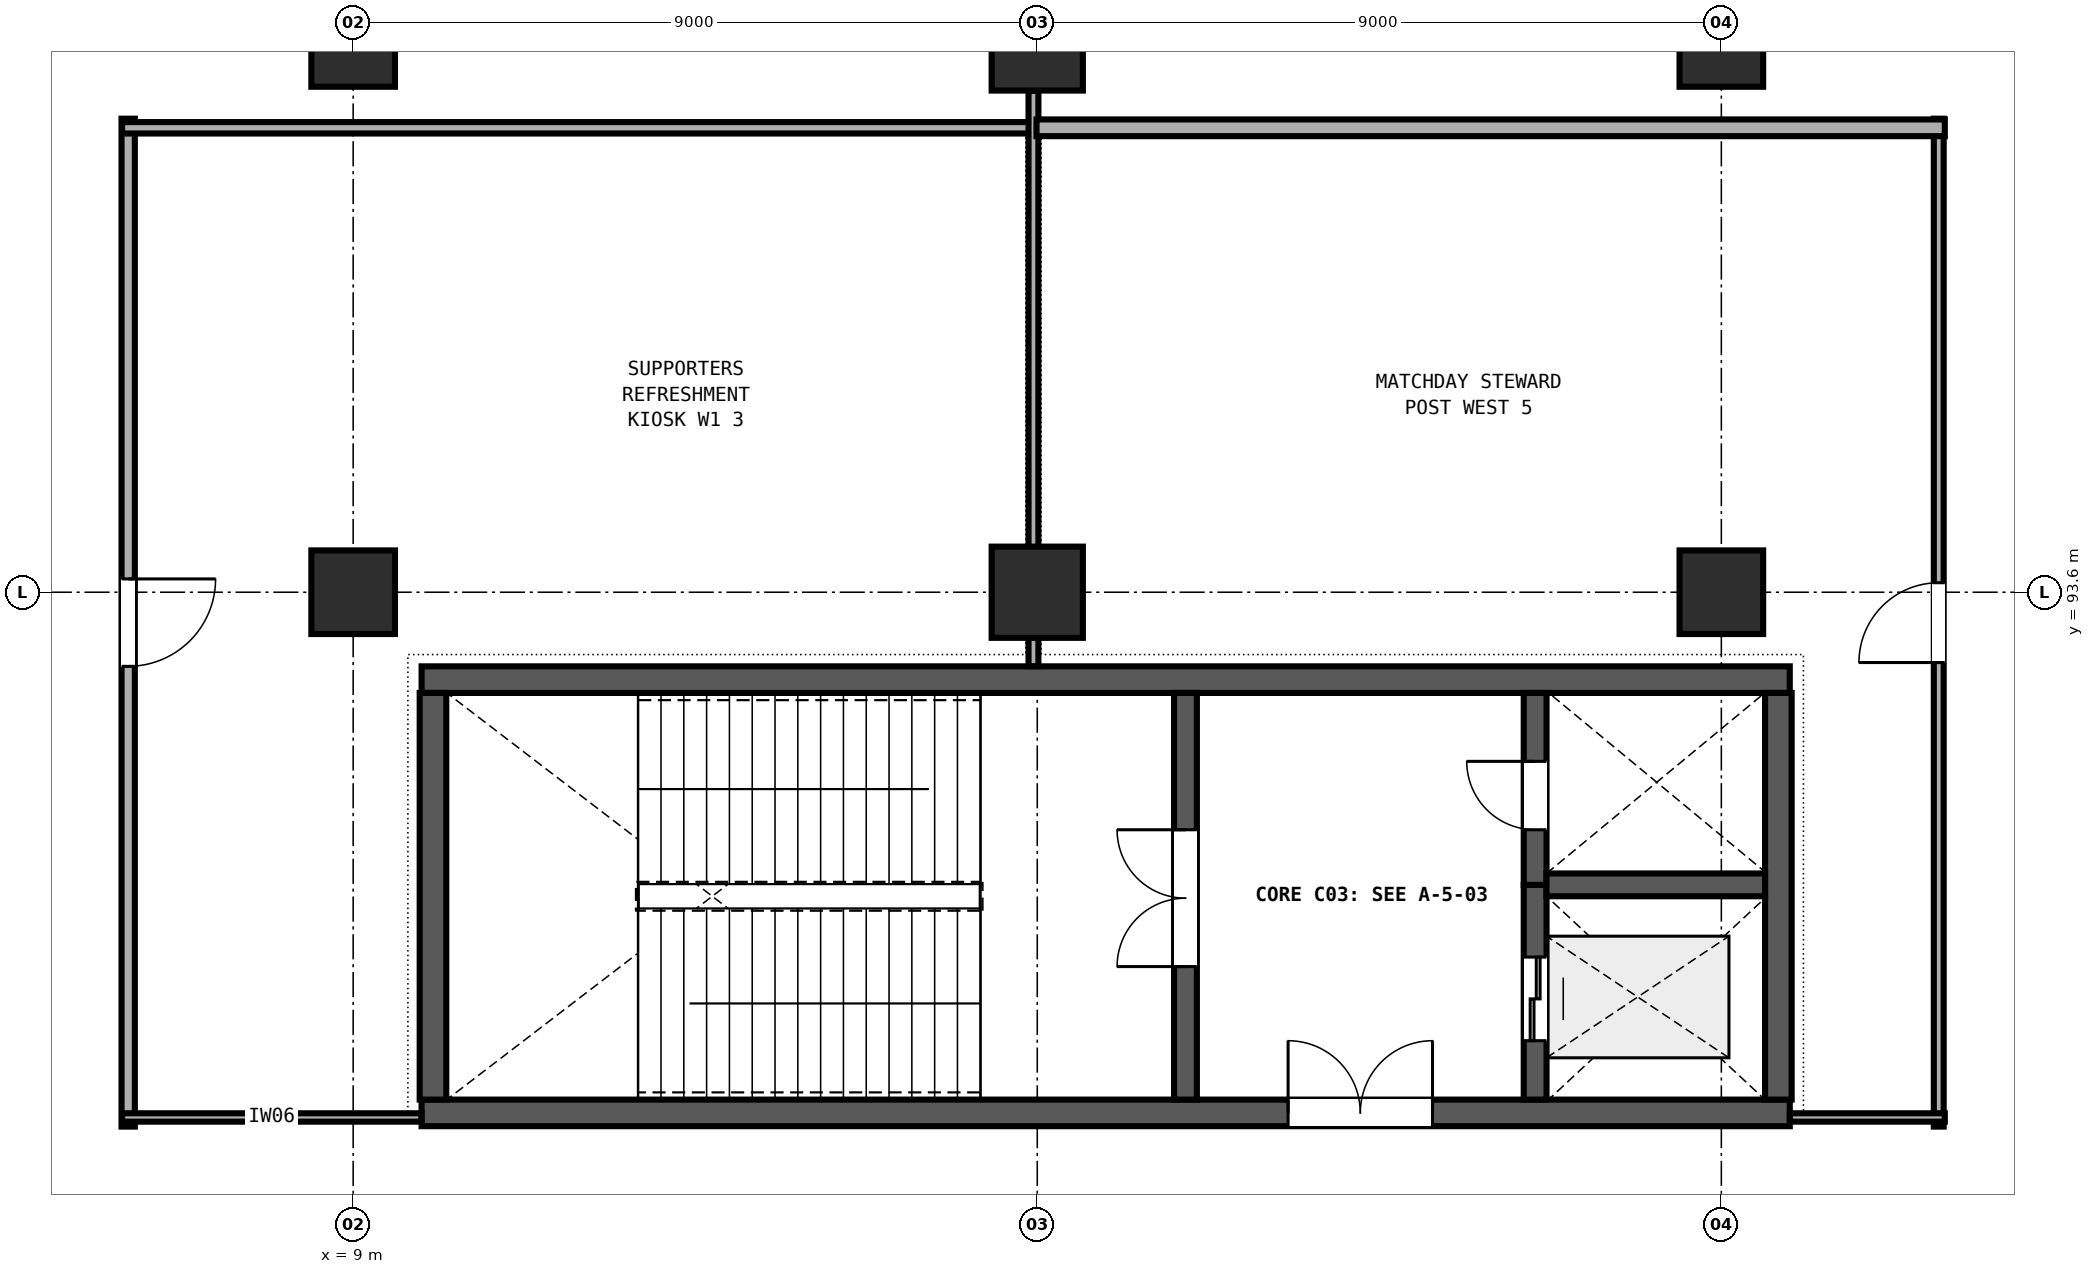
"""IFC4 building model, lengths in metres.
Left out: names, types, materials, properties, quantities, classifications, styles, units other than length and angle.
Written with IfcOpenShell. Run it as: python <this file> out.ifc"""

import sys

from ifc_helpers import new_model, si_unit, direction, frame, frame_2d, origin, origin_2d, place, context, subcontext, project, spatial, rectangle, extrude, element, fill, save


model = new_model("IFC4")
c1 = context("Model", 3, precision=1e-05, world=origin(), true_north=direction((0.0, 1.0)))
c2 = subcontext(c1, "Body", "Model", "MODEL_VIEW")
j1 = project(units=[si_unit("LENGTHUNIT", "METRE"), si_unit("PLANEANGLEUNIT", "RADIAN")], contexts=[c1])
p1 = place(None, origin())
s1 = spatial("IfcSite", under=j1, at=p1, CompositionType="ELEMENT")
p2 = place(p1, origin())
s2 = spatial("IfcBuilding", under=s1, at=p2, CompositionType="ELEMENT")
p3 = place(p2, frame((0.0, 0.0, 4.8)))
s3 = spatial("IfcBuildingStorey", under=s2, at=p3, CompositionType="ELEMENT", Elevation=4.8)
for number, where, z_axis, x_axis in (
    (1, (9.0, 93.6, 0.0), (0.0, 0.0, 1.0), (1.0, 0.0, 0.0)),
    (2, (9.0, 100.8, 0.0), (0.0, 0.0, 1.0), (1.0, 0.0, 0.0)),
):
    element("IfcColumn", number, at=place(p3, frame(where, z_axis=z_axis, x_axis=x_axis)), inside=s3, PredefinedType="COLUMN", context=c2, shape_type="SweptSolid", body=[
        extrude(rectangle(XDim=1.1, YDim=1.1, at=origin_2d()), origin(), (0.0, 0.0, 1.0), 4.8),
    ])
for number, where, z_axis, x_axis in (
    (3, (18.0, 93.6, 0.0), (0.0, 0.0, 1.0), (1.0, 0.0, 0.0)),
    (4, (18.0, 100.8, 0.0), (0.0, 0.0, 1.0), (1.0, 0.0, 0.0)),
):
    element("IfcColumn", number, at=place(p3, frame(where, z_axis=z_axis, x_axis=x_axis)), inside=s3, PredefinedType="COLUMN", context=c2, shape_type="SweptSolid", body=[
        extrude(rectangle(XDim=1.2, YDim=1.2, at=origin_2d()), origin(), (0.0, 0.0, 1.0), 4.8),
    ])
for number, where, z_axis, x_axis in (
    (5, (27.0, 93.6, 0.0), (0.0, 0.0, 1.0), (1.0, 0.0, 0.0)),
    (6, (27.0, 100.8, 0.0), (0.0, 0.0, 1.0), (1.0, 0.0, 0.0)),
):
    element("IfcColumn", number, at=place(p3, frame(where, z_axis=z_axis, x_axis=x_axis)), inside=s3, PredefinedType="COLUMN", context=c2, shape_type="SweptSolid", body=[
        extrude(rectangle(XDim=1.1, YDim=1.1, at=origin_2d()), origin(), (0.0, 0.0, 1.0), 4.8),
    ])
p4 = place(p3, frame((9.9, 86.75, 0.0), z_axis=(0.0, 0.0, 1.0), x_axis=(1.0, 0.0, 0.0)))
e7 = element("IfcWall", 7, at=p4, inside=s3, PredefinedType="SHEAR", context=c2, shape_type="SweptSolid", body=[
    extrude(rectangle(XDim=18.0, YDim=0.35, at=frame_2d((9.0, 0.0))), origin(), (0.0, 0.0, 1.0), 4.52),
])
p5 = place(p4, frame((11.4, 0.0, 0.0)))
e8 = element("IfcOpeningElement", 8, at=p5, cuts=e7, PredefinedType="OPENING", context=c2, shape_type="SweptSolid", body=[
    extrude(rectangle(XDim=1.9, YDim=2.25, at=frame_2d((0.95, 1.125))), frame((0.0, 0.185, 0.0), z_axis=(0.0, -1.0, 0.0), x_axis=(1.0, 0.0, 0.0)), (0.0, 0.0, 1.0), 0.37),
])
p6 = place(p3, frame((27.9, 92.45, 0.0), z_axis=(0.0, 0.0, 1.0), x_axis=(-1.0, 0.0, 0.0)))
e9 = element("IfcWall", 9, at=p6, inside=s3, PredefinedType="SHEAR", context=c2, shape_type="SweptSolid", body=[
    extrude(rectangle(XDim=18.0, YDim=0.35, at=frame_2d((9.0, 0.0))), origin(), (0.0, 0.0, 1.0), 4.52),
])
for number, where, z_axis, x_axis in (
    (10, (10.05, 92.275, 0.0), (0.0, 0.0, 1.0), (0.0, -1.0, 0.0)),
    (11, (27.75, 86.925, 0.0), (0.0, 0.0, 1.0), (0.0, 1.0, 0.0)),
):
    element("IfcWall", number, at=place(p3, frame(where, z_axis=z_axis, x_axis=x_axis)), inside=s3, PredefinedType="SHEAR", context=c2, shape_type="SweptSolid", body=[
        extrude(rectangle(XDim=5.35, YDim=0.35, at=frame_2d((2.675, 0.0))), origin(), (0.0, 0.0, 1.0), 4.52),
    ])
p7 = place(p3, frame((19.95, 86.925, 0.0), z_axis=(0.0, 0.0, 1.0), x_axis=(0.0, 1.0, 0.0)))
e12 = element("IfcWall", 12, at=p7, inside=s3, PredefinedType="SHEAR", context=c2, shape_type="SweptSolid", body=[
    extrude(rectangle(XDim=5.35, YDim=0.3, at=frame_2d((2.675, 0.0))), origin(), (0.0, 0.0, 1.0), 4.52),
])
p8 = place(p7, frame((1.75, 0.0, 0.0)))
e13 = element("IfcOpeningElement", 13, at=p8, cuts=e12, PredefinedType="OPENING", context=c2, shape_type="SweptSolid", body=[
    extrude(rectangle(XDim=1.8, YDim=2.25, at=frame_2d((0.9, 1.125))), frame((0.0, 0.16, 0.0), z_axis=(0.0, -1.0, 0.0), x_axis=(1.0, 0.0, 0.0)), (0.0, 0.0, 1.0), 0.32),
])
p9 = place(p3, frame((24.55, 86.925, 0.0), z_axis=(0.0, 0.0, 1.0), x_axis=(0.0, 1.0, 0.0)))
e14 = element("IfcWall", 14, at=p9, inside=s3, PredefinedType="SHEAR", context=c2, shape_type="SweptSolid", body=[
    extrude(rectangle(XDim=2.825, YDim=0.3, at=frame_2d((1.413, 0.0))), origin(), (0.0, 0.0, 1.0), 4.52),
])
p10 = place(p9, frame((0.775, 0.0, 0.0)))
e15 = element("IfcOpeningElement", 15, at=p10, cuts=e14, PredefinedType="OPENING", context=c2, shape_type="SweptSolid", body=[
    extrude(rectangle(XDim=1.1, YDim=2.1, at=frame_2d((0.55, 1.05))), frame((0.0, 0.16, 0.0), z_axis=(0.0, -1.0, 0.0), x_axis=(1.0, 0.0, 0.0)), (0.0, 0.0, 1.0), 0.32),
])
p11 = place(p3, frame((24.55, 89.75, 0.0), z_axis=(0.0, 0.0, 1.0), x_axis=(0.0, 1.0, 0.0)))
e16 = element("IfcWall", 16, at=p11, inside=s3, PredefinedType="SHEAR", context=c2, shape_type="SweptSolid", body=[
    extrude(rectangle(XDim=2.525, YDim=0.3, at=frame_2d((1.262, 0.0))), origin(), (0.0, 0.0, 1.0), 4.52),
])
p12 = place(p11, frame((0.725, 0.0, 0.0)))
e17 = element("IfcOpeningElement", 17, at=p12, cuts=e16, PredefinedType="OPENING", context=c2, shape_type="SweptSolid", body=[
    extrude(rectangle(XDim=0.9, YDim=2.1, at=frame_2d((0.45, 1.05))), frame((0.0, 0.16, 0.0), z_axis=(0.0, -1.0, 0.0), x_axis=(1.0, 0.0, 0.0)), (0.0, 0.0, 1.0), 0.32),
])
p13 = place(p3, frame((24.7, 89.75, 0.0), z_axis=(0.0, 0.0, 1.0), x_axis=(1.0, 0.0, 0.0)))
e18 = element("IfcWall", 18, at=p13, inside=s3, PredefinedType="SHEAR", context=c2, shape_type="SweptSolid", body=[
    extrude(rectangle(XDim=2.875, YDim=0.3, at=frame_2d((1.438, 0.0))), origin(), (0.0, 0.0, 1.0), 4.52),
])
p14 = place(p3, frame((6.04, 99.83, 0.0), z_axis=(0.0, 0.0, 1.0), x_axis=(0.0, -1.0, 0.0)))
e19 = element("IfcWall", 19, at=p14, inside=s3, PredefinedType="PARTITIONING", context=c2, shape_type="SweptSolid", body=[
    extrude(rectangle(XDim=13.26, YDim=0.175, at=frame_2d((6.63, 0.0))), origin(), (0.0, 0.0, 1.0), 3.28),
])
p15 = place(p14, frame((6.055, 0.0, 0.0)))
e20 = element("IfcOpeningElement", 20, at=p15, cuts=e19, PredefinedType="OPENING", context=c2, shape_type="SweptSolid", body=[
    extrude(rectangle(XDim=1.15, YDim=2.15, at=frame_2d((0.575, 1.075))), frame((0.0, 0.097, 0.0), z_axis=(0.0, -1.0, 0.0), x_axis=(1.0, 0.0, 0.0)), (0.0, 0.0, 1.0), 0.195),
])
p16 = place(p3, frame((5.96, 99.71, 0.0), z_axis=(0.0, 0.0, 1.0), x_axis=(1.0, 0.0, 0.0)))
e21 = element("IfcWall", 21, at=p16, inside=s3, PredefinedType="PARTITIONING", context=c2, shape_type="SweptSolid", body=[
    extrude(rectangle(XDim=11.95, YDim=0.15, at=frame_2d((5.975, 0.0))), origin(), (0.0, 0.0, 1.0), 3.28),
])
p17 = place(p3, frame((17.95, 100.198, 0.0), z_axis=(0.0, 0.0, 1.0), x_axis=(0.0, -1.0, 0.0)))
e22 = element("IfcWall", 22, at=p17, inside=s3, PredefinedType="PARTITIONING", context=c2, shape_type="SweptSolid", body=[
    extrude(rectangle(XDim=7.571, YDim=0.13, at=frame_2d((3.786, 0.0))), origin(), (0.0, 0.0, 1.0), 3.28),
])
p18 = place(p3, frame((9.898, 86.69, 0.0), z_axis=(0.0, 0.0, 1.0), x_axis=(-1.0, 0.0, 0.0)))
e23 = element("IfcWall", 23, at=p18, inside=s3, PredefinedType="PARTITIONING", context=c2, shape_type="SweptSolid", body=[
    extrude(rectangle(XDim=3.938, YDim=0.11, at=frame_2d((1.969, 0.0))), origin(), (0.0, 0.0, 1.0), 3.28),
])
p19 = place(p3, frame((29.86, 86.57, 0.0), z_axis=(0.0, 0.0, 1.0), x_axis=(0.0, 1.0, 0.0)))
e24 = element("IfcWall", 24, at=p19, inside=s3, PredefinedType="PARTITIONING", context=c2, shape_type="SweptSolid", body=[
    extrude(rectangle(XDim=13.26, YDim=0.13, at=frame_2d((6.63, 0.0))), origin(), (0.0, 0.0, 1.0), 3.28),
])
p20 = place(p19, frame((6.105, 0.0, 0.0)))
e25 = element("IfcOpeningElement", 25, at=p20, cuts=e24, PredefinedType="OPENING", context=c2, shape_type="SweptSolid", body=[
    extrude(rectangle(XDim=1.05, YDim=2.1, at=frame_2d((0.525, 1.05))), frame((0.0, 0.075, 0.0), z_axis=(0.0, -1.0, 0.0), x_axis=(1.0, 0.0, 0.0)), (0.0, 0.0, 1.0), 0.15),
])
p21 = place(p3, frame((29.94, 86.69, 0.0), z_axis=(0.0, 0.0, 1.0), x_axis=(-1.0, 0.0, 0.0)))
e26 = element("IfcWall", 26, at=p21, inside=s3, PredefinedType="PARTITIONING", context=c2, shape_type="SweptSolid", body=[
    extrude(rectangle(XDim=2.038, YDim=0.11, at=frame_2d((1.019, 0.0))), origin(), (0.0, 0.0, 1.0), 3.28),
])
p22 = place(p3, frame((17.99, 99.71, 0.0), z_axis=(0.0, 0.0, 1.0), x_axis=(1.0, 0.0, 0.0)))
e27 = element("IfcWall", 27, at=p22, inside=s3, PredefinedType="PARTITIONING", context=c2, shape_type="SweptSolid", body=[
    extrude(rectangle(XDim=11.95, YDim=0.22, at=frame_2d((5.975, 0.0))), origin(), (0.0, 0.0, 1.0), 3.28),
])
p23 = place(p8, origin())
e28 = element("IfcDoor", 28, at=p23, inside=s3, OperationType="DOUBLE_DOOR_SINGLE_SWING", PredefinedType="DOOR", context=c2, shape_type="SweptSolid", body=[
    extrude(rectangle(XDim=1.8, YDim=2.25, at=frame_2d((0.9, 1.125))), frame((0.0, 0.025, 0.0), z_axis=(0.0, -1.0, 0.0), x_axis=(1.0, 0.0, 0.0)), (0.0, 0.0, 1.0), 0.05),
])
fill(e13, e28)
p24 = place(p12, origin())
e29 = element("IfcDoor", 29, at=p24, inside=s3, OperationType="SINGLE_SWING_RIGHT", PredefinedType="DOOR", context=c2, shape_type="SweptSolid", body=[
    extrude(rectangle(XDim=0.9, YDim=2.1, at=frame_2d((0.45, 1.05))), frame((0.0, 0.025, 0.0), z_axis=(0.0, -1.0, 0.0), x_axis=(1.0, 0.0, 0.0)), (0.0, 0.0, 1.0), 0.05),
])
fill(e17, e29)
p25 = place(p10, origin())
e30 = element("IfcDoor", 30, at=p25, inside=s3, OperationType="DOUBLE_DOOR_SLIDING", PredefinedType="DOOR", context=c2, shape_type="SweptSolid", body=[
    extrude(rectangle(XDim=1.1, YDim=2.1, at=frame_2d((0.55, 1.05))), frame((0.0, 0.025, 0.0), z_axis=(0.0, -1.0, 0.0), x_axis=(1.0, 0.0, 0.0)), (0.0, 0.0, 1.0), 0.05),
])
fill(e15, e30)
p26 = place(p5, origin())
e31 = element("IfcDoor", 31, at=p26, inside=s3, OperationType="DOUBLE_DOOR_SINGLE_SWING", PredefinedType="DOOR", context=c2, shape_type="SweptSolid", body=[
    extrude(rectangle(XDim=1.9, YDim=2.25, at=frame_2d((0.95, 1.125))), frame((0.0, 0.025, 0.0), z_axis=(0.0, -1.0, 0.0), x_axis=(1.0, 0.0, 0.0)), (0.0, 0.0, 1.0), 0.05),
])
fill(e8, e31)
p27 = place(p15, origin())
e32 = element("IfcDoor", 32, at=p27, inside=s3, OperationType="SINGLE_SWING_LEFT", PredefinedType="DOOR", context=c2, shape_type="SweptSolid", body=[
    extrude(rectangle(XDim=1.15, YDim=2.15, at=frame_2d((0.575, 1.075))), frame((0.0, 0.025, 0.0), z_axis=(0.0, -1.0, 0.0), x_axis=(1.0, 0.0, 0.0)), (0.0, 0.0, 1.0), 0.05),
])
fill(e20, e32)
p28 = place(p20, origin())
e33 = element("IfcDoor", 33, at=p28, inside=s3, OperationType="SINGLE_SWING_LEFT", PredefinedType="DOOR", context=c2, shape_type="SweptSolid", body=[
    extrude(rectangle(XDim=1.05, YDim=2.1, at=frame_2d((0.525, 1.05))), frame((0.0, 0.025, 0.0), z_axis=(0.0, -1.0, 0.0), x_axis=(1.0, 0.0, 0.0)), (0.0, 0.0, 1.0), 0.05),
])
fill(e25, e33)
save(model, sys.argv[1])
